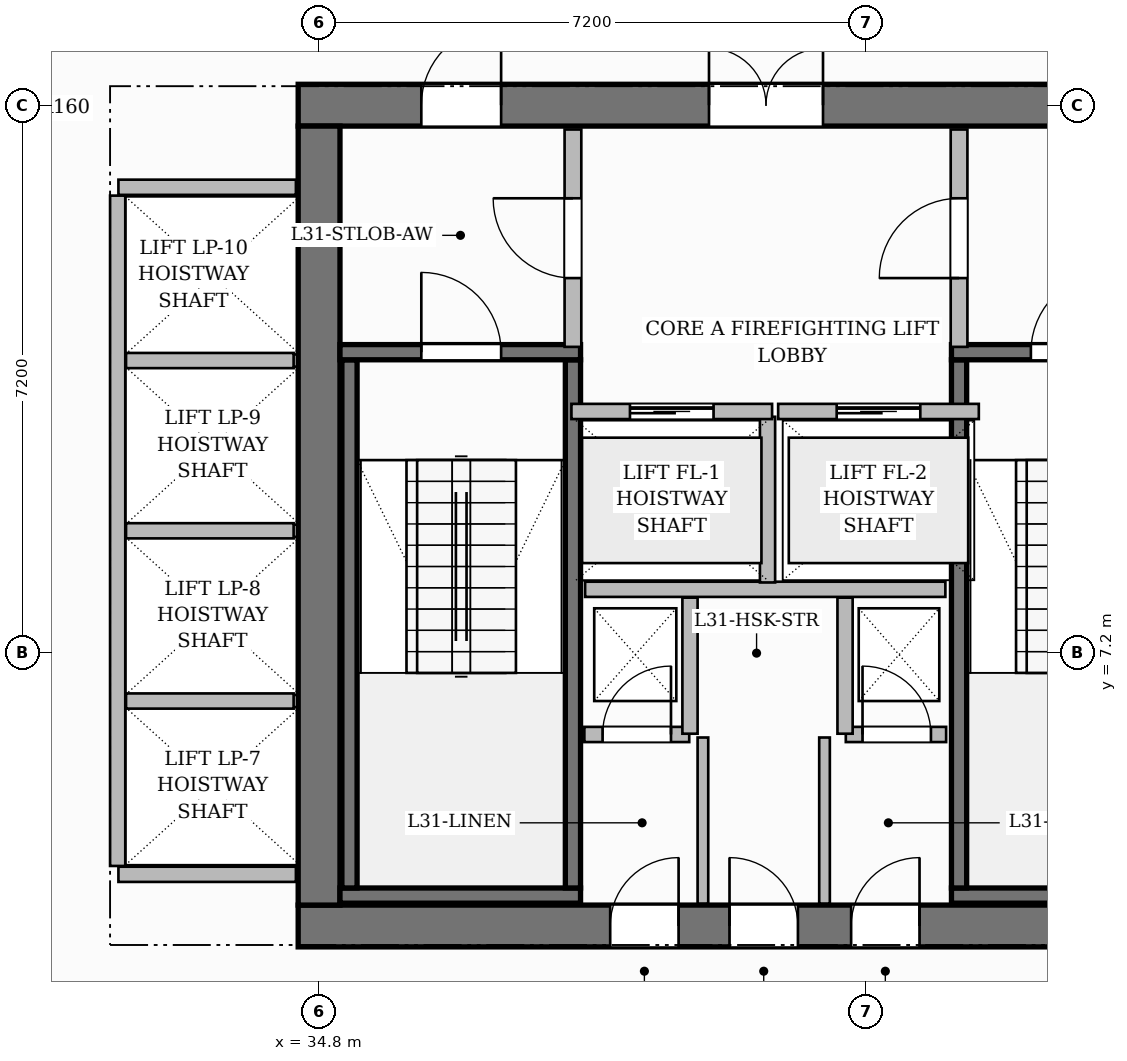
"""IFC4 building model, lengths in metres.
Left out: names, types, materials, properties, quantities, classifications, styles, units other than length and angle.
Written with IfcOpenShell. Run it as: python <this file> out.ifc"""

import sys

from ifc_helpers import new_model, si_unit, direction, frame, frame_2d, origin, place, context, subcontext, project, spatial, rectangle, extrude, source, transform, mapped, element, fill, save


model = new_model("IFC4")
c1 = context("Model", 3, precision=1e-05, world=origin(), true_north=direction((0.0, 1.0)))
c2 = subcontext(c1, "Body", "Model", "MODEL_VIEW")
j1 = project(units=[si_unit("LENGTHUNIT", "METRE"), si_unit("PLANEANGLEUNIT", "RADIAN")], contexts=[c1])
p1 = place(None, origin())
s1 = spatial("IfcSite", under=j1, at=p1, CompositionType="ELEMENT")
p2 = place(p1, origin())
s2 = spatial("IfcBuilding", under=s1, at=p2, CompositionType="ELEMENT")
p3 = place(p2, frame((0.0, 0.0, 126.6)))
s3 = spatial("IfcBuildingStorey", under=s2, at=p3, CompositionType="ELEMENT", Elevation=126.6)
p4 = place(p3, frame((34.525, 3.6, 0.0), z_axis=(0.0, 0.0, 1.0), x_axis=(1.0, 0.0, 0.0)))
e1 = element("IfcWall", 1, at=p4, inside=s3, PredefinedType="SHEAR", context=c2, shape_type="SweptSolid", body=[
    extrude(rectangle(XDim=15.55, YDim=0.55, at=frame_2d((7.775, 0.0))), origin(), (0.0, 0.0, 1.0), 3.7),
])
p5 = place(p4, frame((4.105, 0.0, 0.0)))
e2 = element("IfcOpeningElement", 2, at=p5, cuts=e1, PredefinedType="OPENING", context=c2, shape_type="SweptSolid", body=[
    extrude(rectangle(XDim=0.9, YDim=2.1, at=frame_2d((0.45, 1.05))), frame((0.0, 0.285, 0.0), z_axis=(0.0, -1.0, 0.0), x_axis=(1.0, 0.0, 0.0)), (0.0, 0.0, 1.0), 0.57),
])
p6 = place(p4, frame((5.675, 0.0, 0.0)))
e3 = element("IfcOpeningElement", 3, at=p6, cuts=e1, PredefinedType="OPENING", context=c2, shape_type="SweptSolid", body=[
    extrude(rectangle(XDim=0.9, YDim=2.1, at=frame_2d((0.45, 1.05))), frame((0.0, 0.285, 0.0), z_axis=(0.0, -1.0, 0.0), x_axis=(1.0, 0.0, 0.0)), (0.0, 0.0, 1.0), 0.57),
])
p7 = place(p4, frame((7.275, 0.0, 0.0)))
e4 = element("IfcOpeningElement", 4, at=p7, cuts=e1, PredefinedType="OPENING", context=c2, shape_type="SweptSolid", body=[
    extrude(rectangle(XDim=0.9, YDim=2.1, at=frame_2d((0.45, 1.05))), frame((0.0, 0.285, 0.0), z_axis=(0.0, -1.0, 0.0), x_axis=(1.0, 0.0, 0.0)), (0.0, 0.0, 1.0), 0.57),
])
p8 = place(p3, frame((34.525, 14.4, 0.0), z_axis=(0.0, 0.0, 1.0), x_axis=(1.0, 0.0, 0.0)))
e5 = element("IfcWall", 5, at=p8, inside=s3, PredefinedType="SHEAR", context=c2, shape_type="SweptSolid", body=[
    extrude(rectangle(XDim=15.55, YDim=0.55, at=frame_2d((7.775, 0.0))), origin(), (0.0, 0.0, 1.0), 3.7),
])
p9 = place(p8, frame((5.405, 0.0, 0.0)))
e6 = element("IfcOpeningElement", 6, at=p9, cuts=e5, PredefinedType="OPENING", context=c2, shape_type="SweptSolid", body=[
    extrude(rectangle(XDim=1.5, YDim=2.2, at=frame_2d((0.75, 1.1))), frame((0.0, 0.285, 0.0), z_axis=(0.0, -1.0, 0.0), x_axis=(1.0, 0.0, 0.0)), (0.0, 0.0, 1.0), 0.57),
])
p10 = place(p8, frame((1.62, 0.0, 0.0)))
e7 = element("IfcOpeningElement", 7, at=p10, cuts=e5, PredefinedType="OPENING", context=c2, shape_type="SweptSolid", body=[
    extrude(rectangle(XDim=1.05, YDim=2.15, at=frame_2d((0.525, 1.075))), frame((0.0, 0.285, 0.0), z_axis=(0.0, -1.0, 0.0), x_axis=(1.0, 0.0, 0.0)), (0.0, 0.0, 1.0), 0.57),
])
p11 = place(p8, frame((11.25, 0.0, 0.0)))
e8 = element("IfcOpeningElement", 8, at=p11, cuts=e5, PredefinedType="OPENING", context=c2, shape_type="SweptSolid", body=[
    extrude(rectangle(XDim=1.05, YDim=2.15, at=frame_2d((0.525, 1.075))), frame((0.0, 0.285, 0.0), z_axis=(0.0, -1.0, 0.0), x_axis=(1.0, 0.0, 0.0)), (0.0, 0.0, 1.0), 0.57),
])
p12 = place(p3, frame((34.8, 3.875, 0.0), z_axis=(0.0, 0.0, 1.0), x_axis=(0.0, 1.0, 0.0)))
e9 = element("IfcWall", 9, at=p12, inside=s3, PredefinedType="SHEAR", context=c2, shape_type="SweptSolid", body=[
    extrude(rectangle(XDim=10.25, YDim=0.55, at=frame_2d((5.125, 0.0))), origin(), (0.0, 0.0, 1.0), 3.7),
])
p13 = place(p3, frame((35.075, 4.0, 0.0), z_axis=(0.0, 0.0, 1.0), x_axis=(1.0, 0.0, 0.0)))
e10 = element("IfcWall", 10, at=p13, inside=s3, PredefinedType="SHEAR", context=c2, shape_type="SweptSolid", body=[
    extrude(rectangle(XDim=3.165, YDim=0.2, at=frame_2d((1.583, 0.0))), origin(), (0.0, 0.0, 1.0), 3.7),
])
for number, where, z_axis, x_axis in (
    (11, (35.2, 4.1, 0.0), (0.0, 0.0, 1.0), (0.0, 1.0, 0.0)),
    (12, (38.14, 4.1, 0.0), (0.0, 0.0, 1.0), (0.0, 1.0, 0.0)),
):
    element("IfcWall", number, at=place(p3, frame(where, z_axis=z_axis, x_axis=x_axis)), inside=s3, PredefinedType="SHEAR", context=c2, shape_type="SweptSolid", body=[
        extrude(rectangle(XDim=6.95, YDim=0.2, at=frame_2d((3.475, 0.0))), origin(), (0.0, 0.0, 1.0), 3.7),
    ])
p14 = place(p3, frame((35.075, 11.15, 0.0), z_axis=(0.0, 0.0, 1.0), x_axis=(1.0, 0.0, 0.0)))
e13 = element("IfcWall", 13, at=p14, inside=s3, PredefinedType="SHEAR", context=c2, shape_type="SweptSolid", body=[
    extrude(rectangle(XDim=3.165, YDim=0.2, at=frame_2d((1.583, 0.0))), origin(), (0.0, 0.0, 1.0), 3.7),
])
p15 = place(p14, frame((1.07, 0.0, 0.0)))
e14 = element("IfcOpeningElement", 14, at=p15, cuts=e13, PredefinedType="OPENING", context=c2, shape_type="SweptSolid", body=[
    extrude(rectangle(XDim=1.05, YDim=2.2, at=frame_2d((0.525, 1.1))), frame((0.0, 0.11, 0.0), z_axis=(0.0, -1.0, 0.0), x_axis=(1.0, 0.0, 0.0)), (0.0, 0.0, 1.0), 0.22),
])
p16 = place(p3, frame((43.12, 4.0, 0.0), z_axis=(0.0, 0.0, 1.0), x_axis=(1.0, 0.0, 0.0)))
e15 = element("IfcWall", 15, at=p16, inside=s3, PredefinedType="SHEAR", context=c2, shape_type="SweptSolid", body=[
    extrude(rectangle(XDim=6.405, YDim=0.2, at=frame_2d((3.202, 0.0))), origin(), (0.0, 0.0, 1.0), 3.7),
])
p17 = place(p3, frame((43.22, 4.1, 0.0), z_axis=(0.0, 0.0, 1.0), x_axis=(0.0, 1.0, 0.0)))
e16 = element("IfcWall", 16, at=p17, inside=s3, PredefinedType="SHEAR", context=c2, shape_type="SweptSolid", body=[
    extrude(rectangle(XDim=6.95, YDim=0.2, at=frame_2d((3.475, 0.0))), origin(), (0.0, 0.0, 1.0), 3.7),
])
p18 = place(p3, frame((43.12, 11.15, 0.0), z_axis=(0.0, 0.0, 1.0), x_axis=(1.0, 0.0, 0.0)))
e17 = element("IfcWall", 17, at=p18, inside=s3, PredefinedType="SHEAR", context=c2, shape_type="SweptSolid", body=[
    extrude(rectangle(XDim=6.405, YDim=0.2, at=frame_2d((3.202, 0.0))), origin(), (0.0, 0.0, 1.0), 3.7),
])
p19 = place(p18, frame((1.045, 0.0, 0.0)))
e18 = element("IfcOpeningElement", 18, at=p19, cuts=e17, PredefinedType="OPENING", context=c2, shape_type="SweptSolid", body=[
    extrude(rectangle(XDim=1.05, YDim=2.2, at=frame_2d((0.525, 1.1))), frame((0.0, 0.11, 0.0), z_axis=(0.0, -1.0, 0.0), x_axis=(1.0, 0.0, 0.0)), (0.0, 0.0, 1.0), 0.22),
])
p20 = place(p18, frame((4.125, 0.0, 0.0)))
e19 = element("IfcOpeningElement", 19, at=p20, cuts=e17, PredefinedType="OPENING", context=c2, shape_type="SweptSolid", body=[
    extrude(rectangle(XDim=1.05, YDim=2.2, at=frame_2d((0.525, 1.1))), frame((0.0, 0.11, 0.0), z_axis=(0.0, -1.0, 0.0), x_axis=(1.0, 0.0, 0.0)), (0.0, 0.0, 1.0), 0.22),
])
p21 = place(p3, frame((38.3, 8.03, 0.0), z_axis=(0.0, 0.0, 1.0), x_axis=(1.0, 0.0, 0.0)))
e20 = element("IfcWall", 20, at=p21, inside=s3, PredefinedType="PARTITIONING", context=c2, shape_type="SweptSolid", body=[
    extrude(rectangle(XDim=4.74, YDim=0.2, at=frame_2d((2.37, 0.0))), origin(), (0.0, 0.0, 1.0), 3.45),
])
p22 = place(p3, frame((40.7, 8.12, 0.0), z_axis=(0.0, 0.0, 1.0), x_axis=(0.0, 1.0, 0.0)))
e21 = element("IfcWall", 21, at=p22, inside=s3, PredefinedType="PARTITIONING", context=c2, shape_type="SweptSolid", body=[
    extrude(rectangle(XDim=2.18, YDim=0.2, at=frame_2d((1.09, 0.0))), origin(), (0.0, 0.0, 1.0), 3.45),
])
p23 = place(p3, frame((38.14, 11.22, 0.0), z_axis=(0.0, 0.0, 1.0), x_axis=(0.0, 1.0, 0.0)))
e22 = element("IfcWall", 22, at=p23, inside=s3, PredefinedType="PARTITIONING", context=c2, shape_type="SweptSolid", body=[
    extrude(rectangle(XDim=2.86, YDim=0.22, at=frame_2d((1.43, 0.0))), origin(), (0.0, 0.0, 1.0), 3.45),
])
p24 = place(p23, frame((0.905, 0.0, 0.0)))
e23 = element("IfcOpeningElement", 23, at=p24, cuts=e22, PredefinedType="OPENING", context=c2, shape_type="SweptSolid", body=[
    extrude(rectangle(XDim=1.05, YDim=2.15, at=frame_2d((0.525, 1.075))), frame((0.0, 0.12, 0.0), z_axis=(0.0, -1.0, 0.0), x_axis=(1.0, 0.0, 0.0)), (0.0, 0.0, 1.0), 0.24),
])
p25 = place(p3, frame((43.22, 11.22, 0.0), z_axis=(0.0, 0.0, 1.0), x_axis=(0.0, 1.0, 0.0)))
e24 = element("IfcWall", 24, at=p25, inside=s3, PredefinedType="PARTITIONING", context=c2, shape_type="SweptSolid", body=[
    extrude(rectangle(XDim=2.86, YDim=0.22, at=frame_2d((1.43, 0.0))), origin(), (0.0, 0.0, 1.0), 3.45),
])
p26 = place(p25, frame((0.905, 0.0, 0.0)))
e25 = element("IfcOpeningElement", 25, at=p26, cuts=e24, PredefinedType="OPENING", context=c2, shape_type="SweptSolid", body=[
    extrude(rectangle(XDim=1.05, YDim=2.15, at=frame_2d((0.525, 1.075))), frame((0.0, 0.12, 0.0), z_axis=(0.0, -1.0, 0.0), x_axis=(1.0, 0.0, 0.0)), (0.0, 0.0, 1.0), 0.24),
])
p27 = place(p3, frame((38.29, 6.12, 0.0), z_axis=(0.0, 0.0, 1.0), x_axis=(1.0, 0.0, 0.0)))
e26 = element("IfcWall", 26, at=p27, inside=s3, PredefinedType="PARTITIONING", context=c2, shape_type="SweptSolid", body=[
    extrude(rectangle(XDim=1.38, YDim=0.2, at=frame_2d((0.69, 0.0))), origin(), (0.0, 0.0, 1.0), 3.45),
])
p28 = place(p27, frame((0.24, 0.0, 0.0)))
e27 = element("IfcOpeningElement", 27, at=p28, cuts=e26, PredefinedType="OPENING", context=c2, shape_type="SweptSolid", body=[
    extrude(rectangle(XDim=0.9, YDim=2.1, at=frame_2d((0.45, 1.05))), frame((0.0, 0.11, 0.0), z_axis=(0.0, -1.0, 0.0), x_axis=(1.0, 0.0, 0.0)), (0.0, 0.0, 1.0), 0.22),
])
p29 = place(p3, frame((39.68, 6.13, 0.0), z_axis=(0.0, 0.0, 1.0), x_axis=(0.0, 1.0, 0.0)))
e28 = element("IfcWall", 28, at=p29, inside=s3, PredefinedType="PARTITIONING", context=c2, shape_type="SweptSolid", body=[
    extrude(rectangle(XDim=1.79, YDim=0.2, at=frame_2d((0.895, 0.0))), origin(), (0.0, 0.0, 1.0), 3.45),
])
p30 = place(p3, frame((41.73, 6.12, 0.0), z_axis=(0.0, 0.0, 1.0), x_axis=(1.0, 0.0, 0.0)))
e29 = element("IfcWall", 29, at=p30, inside=s3, PredefinedType="PARTITIONING", context=c2, shape_type="SweptSolid", body=[
    extrude(rectangle(XDim=1.32, YDim=0.2, at=frame_2d((0.66, 0.0))), origin(), (0.0, 0.0, 1.0), 3.45),
])
p31 = place(p30, frame((0.22, 0.0, 0.0)))
e30 = element("IfcOpeningElement", 30, at=p31, cuts=e29, PredefinedType="OPENING", context=c2, shape_type="SweptSolid", body=[
    extrude(rectangle(XDim=0.9, YDim=2.1, at=frame_2d((0.45, 1.05))), frame((0.0, 0.11, 0.0), z_axis=(0.0, -1.0, 0.0), x_axis=(1.0, 0.0, 0.0)), (0.0, 0.0, 1.0), 0.22),
])
p32 = place(p3, frame((41.72, 6.13, 0.0), z_axis=(0.0, 0.0, 1.0), x_axis=(0.0, 1.0, 0.0)))
e31 = element("IfcWall", 31, at=p32, inside=s3, PredefinedType="PARTITIONING", context=c2, shape_type="SweptSolid", body=[
    extrude(rectangle(XDim=1.79, YDim=0.2, at=frame_2d((0.895, 0.0))), origin(), (0.0, 0.0, 1.0), 3.45),
])
for number, where, z_axis, x_axis in (
    (32, (39.85, 3.895, 0.0), (0.0, 0.0, 1.0), (0.0, 1.0, 0.0)),
    (33, (41.45, 3.895, 0.0), (0.0, 0.0, 1.0), (0.0, 1.0, 0.0)),
):
    element("IfcWall", number, at=place(p3, frame(where, z_axis=z_axis, x_axis=x_axis)), inside=s3, PredefinedType="PARTITIONING", context=c2, shape_type="SweptSolid", body=[
        extrude(rectangle(XDim=2.185, YDim=0.14, at=frame_2d((1.093, 0.0))), origin(), (0.0, 0.0, 1.0), 3.45),
    ])
for number, where, z_axis, x_axis in (
    (34, (32.16, 4.28, 0.0), (0.0, 0.0, 1.0), (1.0, 0.0, 0.0)),
    (35, (32.16, 13.32, 0.0), (0.0, 0.0, 1.0), (1.0, 0.0, 0.0)),
):
    element("IfcWall", number, at=place(p3, frame(where, z_axis=z_axis, x_axis=x_axis)), inside=s3, PredefinedType="PARTITIONING", context=c2, shape_type="SweptSolid", body=[
        extrude(rectangle(XDim=2.335, YDim=0.2, at=frame_2d((1.167, 0.0))), origin(), (0.0, 0.0, 1.0), 3.45),
    ])
p33 = place(p3, frame((32.15, 4.39, 0.0), z_axis=(0.0, 0.0, 1.0), x_axis=(0.0, 1.0, 0.0)))
e36 = element("IfcWall", 36, at=p33, inside=s3, PredefinedType="PARTITIONING", context=c2, shape_type="SweptSolid", body=[
    extrude(rectangle(XDim=8.82, YDim=0.2, at=frame_2d((4.41, 0.0))), origin(), (0.0, 0.0, 1.0), 3.45),
])
for number, where, z_axis, x_axis in (
    (37, (32.26, 6.56, 0.0), (0.0, 0.0, 1.0), (1.0, 0.0, 0.0)),
    (38, (32.26, 8.8, 0.0), (0.0, 0.0, 1.0), (1.0, 0.0, 0.0)),
    (39, (32.26, 11.04, 0.0), (0.0, 0.0, 1.0), (1.0, 0.0, 0.0)),
):
    element("IfcWall", number, at=place(p3, frame(where, z_axis=z_axis, x_axis=x_axis)), inside=s3, PredefinedType="PARTITIONING", context=c2, shape_type="SweptSolid", body=[
        extrude(rectangle(XDim=2.205, YDim=0.2, at=frame_2d((1.103, 0.0))), origin(), (0.0, 0.0, 1.0), 3.45),
    ])
p34 = place(p3, frame((38.12, 10.37, 0.0), z_axis=(0.0, 0.0, 1.0), x_axis=(1.0, 0.0, 0.0)))
e40 = element("IfcWall", 40, at=p34, inside=s3, PredefinedType="PARTITIONING", context=c2, shape_type="SweptSolid", body=[
    extrude(rectangle(XDim=2.64, YDim=0.2, at=frame_2d((1.32, 0.0))), origin(), (0.0, 0.0, 1.0), 3.45),
])
p35 = place(p34, frame((0.77, 0.0, 0.0)))
e41 = element("IfcOpeningElement", 41, at=p35, cuts=e40, PredefinedType="OPENING", context=c2, shape_type="SweptSolid", body=[
    extrude(rectangle(XDim=1.1, YDim=2.2, at=frame_2d((0.55, 1.1))), frame((0.0, 0.11, 0.0), z_axis=(0.0, -1.0, 0.0), x_axis=(1.0, 0.0, 0.0)), (0.0, 0.0, 1.0), 0.22),
])
p36 = place(p3, frame((40.84, 10.37, 0.0), z_axis=(0.0, 0.0, 1.0), x_axis=(1.0, 0.0, 0.0)))
e42 = element("IfcWall", 42, at=p36, inside=s3, PredefinedType="PARTITIONING", context=c2, shape_type="SweptSolid", body=[
    extrude(rectangle(XDim=2.64, YDim=0.2, at=frame_2d((1.32, 0.0))), origin(), (0.0, 0.0, 1.0), 3.45),
])
p37 = place(p36, frame((0.77, 0.0, 0.0)))
e43 = element("IfcOpeningElement", 43, at=p37, cuts=e42, PredefinedType="OPENING", context=c2, shape_type="SweptSolid", body=[
    extrude(rectangle(XDim=1.1, YDim=2.2, at=frame_2d((0.55, 1.1))), frame((0.0, 0.11, 0.0), z_axis=(0.0, -1.0, 0.0), x_axis=(1.0, 0.0, 0.0)), (0.0, 0.0, 1.0), 0.22),
])
m1 = source(origin(), c2, "Body", "SweptSolid", [
    extrude(rectangle(XDim=1.05, YDim=2.2, at=frame_2d((0.525, 1.1))), frame((0.0, 0.025, 0.0), z_axis=(0.0, -1.0, 0.0), x_axis=(1.0, 0.0, 0.0)), (0.0, 0.0, 1.0), 0.05),
])
p38 = place(p15, origin())
e44 = element("IfcDoor", 44, at=p38, inside=s3, OperationType="SINGLE_SWING_LEFT", PredefinedType="DOOR", context=c2, shape_type="MappedRepresentation", body=[
    mapped(m1, transform((0.0, 0.0, 0.0), scale=1.0)),
])
fill(e14, e44)
p39 = place(p19, origin())
e45 = element("IfcDoor", 45, at=p39, inside=s3, OperationType="SINGLE_SWING_RIGHT", PredefinedType="DOOR", context=c2, shape_type="MappedRepresentation", body=[
    mapped(m1, transform((0.0, 0.0, 0.0), scale=1.0)),
])
fill(e18, e45)
m2 = source(origin(), c2, "Body", "SweptSolid", [
    extrude(rectangle(XDim=1.05, YDim=2.15, at=frame_2d((0.525, 1.075))), frame((0.0, 0.025, 0.0), z_axis=(0.0, -1.0, 0.0), x_axis=(1.0, 0.0, 0.0)), (0.0, 0.0, 1.0), 0.05),
])
p40 = place(p24, origin())
e46 = element("IfcDoor", 46, at=p40, inside=s3, OperationType="SINGLE_SWING_RIGHT", PredefinedType="DOOR", context=c2, shape_type="MappedRepresentation", body=[
    mapped(m2, transform((0.0, 0.0, 0.0), scale=1.0)),
])
fill(e23, e46)
p41 = place(p26, origin())
e47 = element("IfcDoor", 47, at=p41, inside=s3, OperationType="SINGLE_SWING_LEFT", PredefinedType="DOOR", context=c2, shape_type="MappedRepresentation", body=[
    mapped(m2, transform((0.0, 0.0, 0.0), scale=1.0)),
])
fill(e25, e47)
m3 = source(origin(), c2, "Body", "SweptSolid", [
    extrude(rectangle(XDim=1.5, YDim=2.2, at=frame_2d((0.75, 1.1))), frame((0.0, 0.025, 0.0), z_axis=(0.0, -1.0, 0.0), x_axis=(1.0, 0.0, 0.0)), (0.0, 0.0, 1.0), 0.05),
])
p42 = place(p9, origin())
e48 = element("IfcDoor", 48, at=p42, inside=s3, OperationType="DOUBLE_DOOR_SINGLE_SWING", PredefinedType="DOOR", context=c2, shape_type="MappedRepresentation", body=[
    mapped(m3, transform((0.0, 0.0, 0.0), scale=1.0)),
])
fill(e6, e48)
p43 = place(p10, origin())
e49 = element("IfcDoor", 49, at=p43, inside=s3, OperationType="SINGLE_SWING_RIGHT", PredefinedType="DOOR", context=c2, shape_type="MappedRepresentation", body=[
    mapped(m2, transform((0.0, 0.0, 0.0), scale=1.0)),
])
fill(e7, e49)
m4 = source(origin(), c2, "Body", "SweptSolid", [
    extrude(rectangle(XDim=0.9, YDim=2.1, at=frame_2d((0.45, 1.05))), frame((0.0, 0.025, 0.0), z_axis=(0.0, -1.0, 0.0), x_axis=(1.0, 0.0, 0.0)), (0.0, 0.0, 1.0), 0.05),
])
p44 = place(p28, origin())
e50 = element("IfcDoor", 50, at=p44, inside=s3, OperationType="SINGLE_SWING_RIGHT", PredefinedType="DOOR", context=c2, shape_type="MappedRepresentation", body=[
    mapped(m4, transform((0.0, 0.0, 0.0), scale=1.0)),
])
fill(e27, e50)
p45 = place(p31, origin())
e51 = element("IfcDoor", 51, at=p45, inside=s3, OperationType="SINGLE_SWING_LEFT", PredefinedType="DOOR", context=c2, shape_type="MappedRepresentation", body=[
    mapped(m4, transform((0.0, 0.0, 0.0), scale=1.0)),
])
fill(e30, e51)
p46 = place(p5, origin())
e52 = element("IfcDoor", 52, at=p46, inside=s3, OperationType="SINGLE_SWING_RIGHT", PredefinedType="DOOR", context=c2, shape_type="MappedRepresentation", body=[
    mapped(m4, transform((0.0, 0.0, 0.0), scale=1.0)),
])
fill(e2, e52)
p47 = place(p6, origin())
e53 = element("IfcDoor", 53, at=p47, inside=s3, OperationType="SINGLE_SWING_LEFT", PredefinedType="DOOR", context=c2, shape_type="MappedRepresentation", body=[
    mapped(m4, transform((0.0, 0.0, 0.0), scale=1.0)),
])
fill(e3, e53)
p48 = place(p7, origin())
e54 = element("IfcDoor", 54, at=p48, inside=s3, OperationType="SINGLE_SWING_RIGHT", PredefinedType="DOOR", context=c2, shape_type="MappedRepresentation", body=[
    mapped(m4, transform((0.0, 0.0, 0.0), scale=1.0)),
])
fill(e4, e54)
m5 = source(origin(), c2, "Body", "SweptSolid", [
    extrude(rectangle(XDim=1.1, YDim=2.2, at=frame_2d((0.55, 1.1))), frame((0.0, 0.025, 0.0), z_axis=(0.0, -1.0, 0.0), x_axis=(1.0, 0.0, 0.0)), (0.0, 0.0, 1.0), 0.05),
])
p49 = place(p35, origin())
e55 = element("IfcDoor", 55, at=p49, inside=s3, OperationType="SLIDING_TO_LEFT", PredefinedType="DOOR", context=c2, shape_type="MappedRepresentation", body=[
    mapped(m5, transform((0.0, 0.0, 0.0), scale=1.0)),
])
fill(e41, e55)
p50 = place(p37, origin())
e56 = element("IfcDoor", 56, at=p50, inside=s3, OperationType="SLIDING_TO_LEFT", PredefinedType="DOOR", context=c2, shape_type="MappedRepresentation", body=[
    mapped(m5, transform((0.0, 0.0, 0.0), scale=1.0)),
])
fill(e43, e56)
save(model, sys.argv[1])
